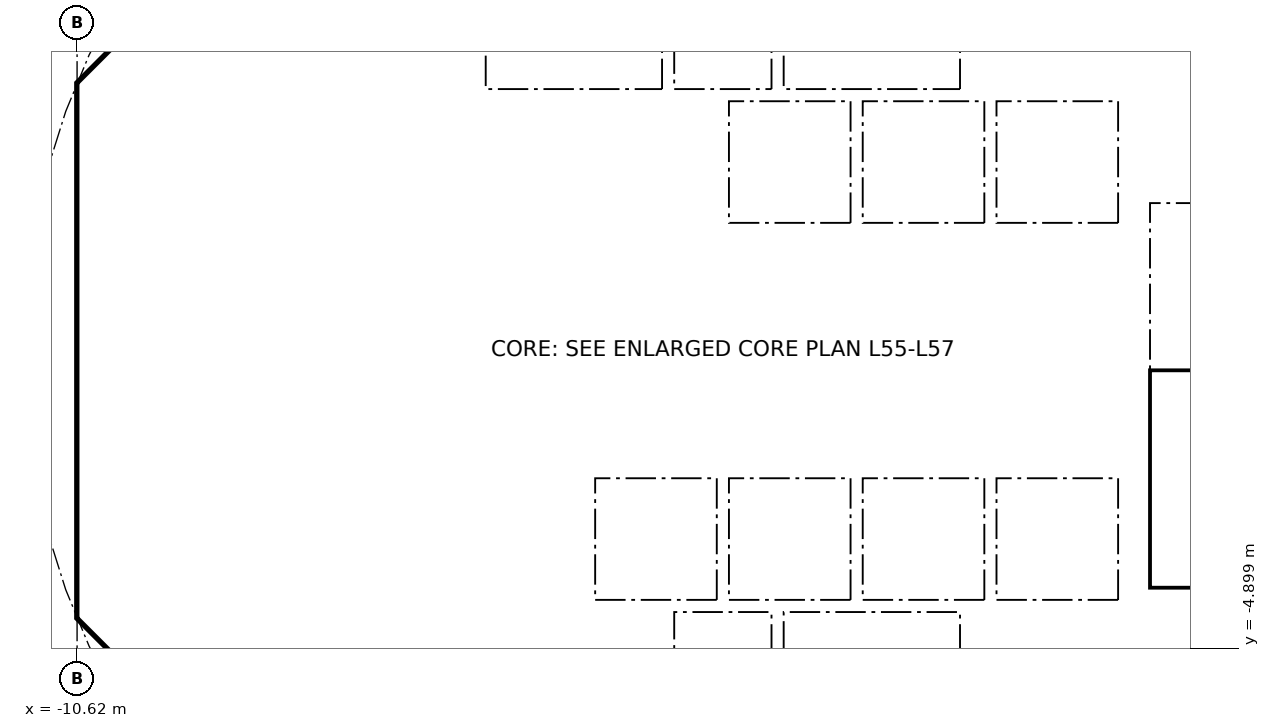
"""IFC4 building model, lengths in metres.
Left out: names, types, materials, properties, quantities, classifications, styles, units other than length and angle.
Written with IfcOpenShell. Run it as: python <this file> out.ifc"""

import sys

from ifc_helpers import new_model, si_unit, direction, frame, frame_2d, origin, place, context, subcontext, project, spatial, polyline, rectangle, outline, extrude, element, fill, save


model = new_model("IFC4")
c1 = context("Model", 3, precision=1e-05, world=origin(), true_north=direction((0.0, 1.0)))
c2 = subcontext(c1, "Body", "Model", "MODEL_VIEW")
j1 = project(units=[si_unit("LENGTHUNIT", "METRE"), si_unit("PLANEANGLEUNIT", "RADIAN")], contexts=[c1])
p1 = place(None, origin())
s1 = spatial("IfcSite", under=j1, at=p1, CompositionType="ELEMENT")
p2 = place(p1, origin())
s2 = spatial("IfcBuilding", under=s1, at=p2, CompositionType="ELEMENT")
p3 = place(p2, frame((0.0, 0.0, 223.3)))
s3 = spatial("IfcBuildingStorey", under=s2, at=p3, CompositionType="ELEMENT", Elevation=223.3)
p4 = place(p3, frame((9.988, 4.613, 0.0), z_axis=(0.0, 0.0, 1.0), x_axis=(-0.707106781187, 0.707106781187, 0.0)))
e1 = element("IfcWall", 1, at=p4, inside=s3, PredefinedType="SHEAR", context=c2, shape_type="SweptSolid", body=[
    extrude(rectangle(XDim=7.602, YDim=0.6, at=frame_2d((3.801, 0.0))), origin(), (0.0, 0.0, 1.0), 3.44),
])
p5 = place(p4, frame((3.201, 0.0, 0.0)))
e2 = element("IfcOpeningElement", 2, at=p5, cuts=e1, PredefinedType="OPENING", context=c2, shape_type="SweptSolid", body=[
    extrude(rectangle(XDim=1.2, YDim=2.1, at=frame_2d((0.6, 1.05))), frame((0.0, 0.31, 0.0), z_axis=(0.0, -1.0, 0.0), x_axis=(1.0, 0.0, 0.0)), (0.0, 0.0, 1.0), 0.62),
])
p6 = place(p3, frame((-4.613, 9.988, 0.0), z_axis=(0.0, 0.0, 1.0), x_axis=(-0.707106781187, -0.707106781187, 0.0)))
e3 = element("IfcWall", 3, at=p6, inside=s3, PredefinedType="SHEAR", context=c2, shape_type="SweptSolid", body=[
    extrude(rectangle(XDim=7.602, YDim=0.6, at=frame_2d((3.801, 0.0))), origin(), (0.0, 0.0, 1.0), 3.44),
])
p7 = place(p6, frame((0.351, 0.0, 0.0)))
e4 = element("IfcOpeningElement", 4, at=p7, cuts=e3, PredefinedType="OPENING", context=c2, shape_type="SweptSolid", body=[
    extrude(rectangle(XDim=1.1, YDim=2.1, at=frame_2d((0.55, 1.05))), frame((0.0, 0.31, 0.0), z_axis=(0.0, -1.0, 0.0), x_axis=(1.0, 0.0, 0.0)), (0.0, 0.0, 1.0), 0.62),
])
p8 = place(p3, frame((-10.325, 3.801, 0.0), z_axis=(0.0, 0.0, 1.0), x_axis=(0.0, -1.0, 0.0)))
e5 = element("IfcWall", 5, at=p8, inside=s3, PredefinedType="SHEAR", context=c2, shape_type="SweptSolid", body=[
    extrude(rectangle(XDim=7.602, YDim=0.6, at=frame_2d((3.801, 0.0))), origin(), (0.0, 0.0, 1.0), 3.44),
])
p9 = place(p8, frame((0.651, 0.0, 0.0)))
e6 = element("IfcOpeningElement", 6, at=p9, cuts=e5, PredefinedType="OPENING", context=c2, shape_type="SweptSolid", body=[
    extrude(rectangle(XDim=1.5, YDim=2.1, at=frame_2d((0.75, 1.05))), frame((0.0, 0.31, 0.0), z_axis=(0.0, -1.0, 0.0), x_axis=(1.0, 0.0, 0.0)), (0.0, 0.0, 1.0), 0.62),
])
p10 = place(p8, frame((5.451, 0.0, 0.0)))
e7 = element("IfcOpeningElement", 7, at=p10, cuts=e5, PredefinedType="OPENING", context=c2, shape_type="SweptSolid", body=[
    extrude(rectangle(XDim=1.5, YDim=2.1, at=frame_2d((0.75, 1.05))), frame((0.0, 0.31, 0.0), z_axis=(0.0, -1.0, 0.0), x_axis=(1.0, 0.0, 0.0)), (0.0, 0.0, 1.0), 0.62),
])
p11 = place(p3, frame((-9.988, -4.613, 0.0), z_axis=(0.0, 0.0, 1.0), x_axis=(0.707106781187, -0.707106781187, 0.0)))
e8 = element("IfcWall", 8, at=p11, inside=s3, PredefinedType="SHEAR", context=c2, shape_type="SweptSolid", body=[
    extrude(rectangle(XDim=7.602, YDim=0.6, at=frame_2d((3.801, 0.0))), origin(), (0.0, 0.0, 1.0), 3.44),
])
p12 = place(p11, frame((6.151, 0.0, 0.0)))
e9 = element("IfcOpeningElement", 9, at=p12, cuts=e8, PredefinedType="OPENING", context=c2, shape_type="SweptSolid", body=[
    extrude(rectangle(XDim=1.1, YDim=2.1, at=frame_2d((0.55, 1.05))), frame((0.0, 0.31, 0.0), z_axis=(0.0, -1.0, 0.0), x_axis=(1.0, 0.0, 0.0)), (0.0, 0.0, 1.0), 0.62),
])
p13 = place(p3, frame((4.613, -9.988, 0.0), z_axis=(0.0, 0.0, 1.0), x_axis=(0.707106781187, 0.707106781187, 0.0)))
e10 = element("IfcWall", 10, at=p13, inside=s3, PredefinedType="SHEAR", context=c2, shape_type="SweptSolid", body=[
    extrude(rectangle(XDim=7.602, YDim=0.6, at=frame_2d((3.801, 0.0))), origin(), (0.0, 0.0, 1.0), 3.44),
])
p14 = place(p13, frame((3.201, 0.0, 0.0)))
e11 = element("IfcOpeningElement", 11, at=p14, cuts=e10, PredefinedType="OPENING", context=c2, shape_type="SweptSolid", body=[
    extrude(rectangle(XDim=1.2, YDim=2.1, at=frame_2d((0.6, 1.05))), frame((0.0, 0.31, 0.0), z_axis=(0.0, -1.0, 0.0), x_axis=(1.0, 0.0, 0.0)), (0.0, 0.0, 1.0), 0.62),
])
p15 = place(p3, frame((-6.2, 4.3, 0.0), z_axis=(0.0, 0.0, 1.0), x_axis=(0.0, 1.0, 0.0)))
e12 = element("IfcWall", 12, at=p15, inside=s3, PredefinedType="PARTITIONING", context=c2, shape_type="SweptSolid", body=[
    extrude(rectangle(XDim=3.527, YDim=0.15, at=frame_2d((1.763, 0.0))), origin(), (0.0, 0.0, 1.0), 3.44),
])
p16 = place(p15, frame((0.262, 0.0, 0.0)))
e13 = element("IfcOpeningElement", 13, at=p16, cuts=e12, PredefinedType="OPENING", context=c2, shape_type="SweptSolid", body=[
    extrude(rectangle(XDim=0.9, YDim=2.1, at=frame_2d((0.45, 1.05))), frame((0.0, 0.085, 0.0), z_axis=(0.0, -1.0, 0.0), x_axis=(1.0, 0.0, 0.0)), (0.0, 0.0, 1.0), 0.17),
])
p17 = place(p15, frame((2.138, 0.0, 0.0)))
e14 = element("IfcOpeningElement", 14, at=p17, cuts=e12, PredefinedType="OPENING", context=c2, shape_type="SweptSolid", body=[
    extrude(rectangle(XDim=0.9, YDim=2.1, at=frame_2d((0.45, 1.05))), frame((0.0, 0.085, 0.0), z_axis=(0.0, -1.0, 0.0), x_axis=(1.0, 0.0, 0.0)), (0.0, 0.0, 1.0), 0.17),
])
p18 = place(p3, frame((4.0, 4.3, 0.0), z_axis=(0.0, 0.0, 1.0), x_axis=(0.0, 1.0, 0.0)))
e15 = element("IfcWall", 15, at=p18, inside=s3, PredefinedType="SOLIDWALL", context=c2, shape_type="SweptSolid", body=[
    extrude(rectangle(XDim=2.2, YDim=0.2, at=frame_2d((1.1, 0.0))), origin(), (0.0, 0.0, 1.0), 3.44),
])
p19 = place(p18, frame((0.55, 0.0, 0.0)))
e16 = element("IfcOpeningElement", 16, at=p19, cuts=e15, PredefinedType="OPENING", context=c2, shape_type="SweptSolid", body=[
    extrude(rectangle(XDim=1.1, YDim=2.1, at=frame_2d((0.55, 1.05))), frame((0.0, 0.11, 0.0), z_axis=(0.0, -1.0, 0.0), x_axis=(1.0, 0.0, 0.0)), (0.0, 0.0, 1.0), 0.22),
])
p20 = place(p3, frame((-4.0, 4.3, 0.0), z_axis=(0.0, 0.0, 1.0), x_axis=(0.0, 1.0, 0.0)))
e17 = element("IfcWall", 17, at=p20, inside=s3, PredefinedType="SOLIDWALL", context=c2, shape_type="SweptSolid", body=[
    extrude(rectangle(XDim=2.2, YDim=0.2, at=frame_2d((1.1, 0.0))), origin(), (0.0, 0.0, 1.0), 3.44),
])
p21 = place(p20, frame((0.55, 0.0, 0.0)))
e18 = element("IfcOpeningElement", 18, at=p21, cuts=e17, PredefinedType="OPENING", context=c2, shape_type="SweptSolid", body=[
    extrude(rectangle(XDim=1.1, YDim=2.1, at=frame_2d((0.55, 1.05))), frame((0.0, 0.11, 0.0), z_axis=(0.0, -1.0, 0.0), x_axis=(1.0, 0.0, 0.0)), (0.0, 0.0, 1.0), 0.22),
])
p22 = place(p3, frame((-6.7, 2.0, 0.0), z_axis=(0.0, 0.0, 1.0), x_axis=(1.0, 0.0, 0.0)))
e19 = element("IfcWall", 19, at=p22, inside=s3, PredefinedType="SOLIDWALL", context=c2, shape_type="SweptSolid", body=[
    extrude(rectangle(XDim=13.4, YDim=0.2, at=frame_2d((6.7, 0.0))), origin(), (0.0, 0.0, 1.0), 3.44),
])
p23 = place(p22, frame((7.25, 0.0, 0.0)))
e20 = element("IfcOpeningElement", 20, at=p23, cuts=e19, PredefinedType="OPENING", context=c2, shape_type="SweptSolid", body=[
    extrude(rectangle(XDim=1.1, YDim=2.1, at=frame_2d((0.55, 1.05))), frame((0.0, 0.11, 0.0), z_axis=(0.0, -1.0, 0.0), x_axis=(1.0, 0.0, 0.0)), (0.0, 0.0, 1.0), 0.22),
])
p24 = place(p22, frame((9.45, 0.0, 0.0)))
e21 = element("IfcOpeningElement", 21, at=p24, cuts=e19, PredefinedType="OPENING", context=c2, shape_type="SweptSolid", body=[
    extrude(rectangle(XDim=1.1, YDim=2.1, at=frame_2d((0.55, 1.05))), frame((0.0, 0.11, 0.0), z_axis=(0.0, -1.0, 0.0), x_axis=(1.0, 0.0, 0.0)), (0.0, 0.0, 1.0), 0.22),
])
p25 = place(p22, frame((1.85, 0.0, 0.0)))
e22 = element("IfcOpeningElement", 22, at=p25, cuts=e19, PredefinedType="OPENING", context=c2, shape_type="SweptSolid", body=[
    extrude(rectangle(XDim=0.9, YDim=2.1, at=frame_2d((0.45, 1.05))), frame((0.0, 0.11, 0.0), z_axis=(0.0, -1.0, 0.0), x_axis=(1.0, 0.0, 0.0)), (0.0, 0.0, 1.0), 0.22),
])
p26 = place(p22, frame((5.15, 0.0, 0.0)))
e23 = element("IfcOpeningElement", 23, at=p26, cuts=e19, PredefinedType="OPENING", context=c2, shape_type="SweptSolid", body=[
    extrude(rectangle(XDim=0.9, YDim=2.1, at=frame_2d((0.45, 1.05))), frame((0.0, 0.11, 0.0), z_axis=(0.0, -1.0, 0.0), x_axis=(1.0, 0.0, 0.0)), (0.0, 0.0, 1.0), 0.22),
])
p27 = place(p3, frame((6.7, 4.0, 0.0), z_axis=(0.0, 0.0, 1.0), x_axis=(1.0, 0.0, 0.0)))
e24 = element("IfcWall", 24, at=p27, inside=s3, PredefinedType="SOLIDWALL", context=c2, shape_type="SweptSolid", body=[
    extrude(rectangle(XDim=3.325, YDim=0.2, at=frame_2d((1.662, 0.0))), origin(), (0.0, 0.0, 1.0), 3.44),
])
p28 = place(p27, frame((1.25, 0.0, 0.0)))
e25 = element("IfcOpeningElement", 25, at=p28, cuts=e24, PredefinedType="OPENING", context=c2, shape_type="SweptSolid", body=[
    extrude(rectangle(XDim=1.1, YDim=2.1, at=frame_2d((0.55, 1.05))), frame((0.0, 0.11, 0.0), z_axis=(0.0, -1.0, 0.0), x_axis=(1.0, 0.0, 0.0)), (0.0, 0.0, 1.0), 0.22),
])
p29 = place(p3, frame((-6.6, -7.427, 0.0), z_axis=(0.0, 0.0, 1.0), x_axis=(0.0, 1.0, 0.0)))
e26 = element("IfcWall", 26, at=p29, inside=s3, PredefinedType="PARTITIONING", context=c2, shape_type="SweptSolid", body=[
    extrude(rectangle(XDim=3.127, YDim=0.15, at=frame_2d((1.563, 0.0))), origin(), (0.0, 0.0, 1.0), 3.44),
])
p30 = place(p29, frame((1.076, 0.0, 0.0)))
e27 = element("IfcOpeningElement", 27, at=p30, cuts=e26, PredefinedType="OPENING", context=c2, shape_type="SweptSolid", body=[
    extrude(rectangle(XDim=0.9, YDim=2.1, at=frame_2d((0.45, 1.05))), frame((0.0, 0.085, 0.0), z_axis=(0.0, -1.0, 0.0), x_axis=(1.0, 0.0, 0.0)), (0.0, 0.0, 1.0), 0.17),
])
p31 = place(p3, frame((4.0, -6.5, 0.0), z_axis=(0.0, 0.0, 1.0), x_axis=(0.0, 1.0, 0.0)))
e28 = element("IfcWall", 28, at=p31, inside=s3, PredefinedType="SOLIDWALL", context=c2, shape_type="SweptSolid", body=[
    extrude(rectangle(XDim=2.2, YDim=0.2, at=frame_2d((1.1, 0.0))), origin(), (0.0, 0.0, 1.0), 3.44),
])
p32 = place(p31, frame((0.55, 0.0, 0.0)))
e29 = element("IfcOpeningElement", 29, at=p32, cuts=e28, PredefinedType="OPENING", context=c2, shape_type="SweptSolid", body=[
    extrude(rectangle(XDim=1.1, YDim=2.1, at=frame_2d((0.55, 1.05))), frame((0.0, 0.11, 0.0), z_axis=(0.0, -1.0, 0.0), x_axis=(1.0, 0.0, 0.0)), (0.0, 0.0, 1.0), 0.22),
])
p33 = place(p3, frame((-4.0, -6.5, 0.0), z_axis=(0.0, 0.0, 1.0), x_axis=(0.0, 1.0, 0.0)))
e30 = element("IfcWall", 30, at=p33, inside=s3, PredefinedType="SOLIDWALL", context=c2, shape_type="SweptSolid", body=[
    extrude(rectangle(XDim=2.2, YDim=0.2, at=frame_2d((1.1, 0.0))), origin(), (0.0, 0.0, 1.0), 3.44),
])
p34 = place(p33, frame((0.65, 0.0, 0.0)))
e31 = element("IfcOpeningElement", 31, at=p34, cuts=e30, PredefinedType="OPENING", context=c2, shape_type="SweptSolid", body=[
    extrude(rectangle(XDim=0.9, YDim=2.1, at=frame_2d((0.45, 1.05))), frame((0.0, 0.11, 0.0), z_axis=(0.0, -1.0, 0.0), x_axis=(1.0, 0.0, 0.0)), (0.0, 0.0, 1.0), 0.22),
])
p35 = place(p3, frame((-6.7, -2.0, 0.0), z_axis=(0.0, 0.0, 1.0), x_axis=(1.0, 0.0, 0.0)))
e32 = element("IfcWall", 32, at=p35, inside=s3, PredefinedType="SOLIDWALL", context=c2, shape_type="SweptSolid", body=[
    extrude(rectangle(XDim=13.4, YDim=0.2, at=frame_2d((6.7, 0.0))), origin(), (0.0, 0.0, 1.0), 3.44),
])
p36 = place(p35, frame((5.05, 0.0, 0.0)))
e33 = element("IfcOpeningElement", 33, at=p36, cuts=e32, PredefinedType="OPENING", context=c2, shape_type="SweptSolid", body=[
    extrude(rectangle(XDim=1.1, YDim=2.1, at=frame_2d((0.55, 1.05))), frame((0.0, 0.11, 0.0), z_axis=(0.0, -1.0, 0.0), x_axis=(1.0, 0.0, 0.0)), (0.0, 0.0, 1.0), 0.22),
])
p37 = place(p35, frame((7.25, 0.0, 0.0)))
e34 = element("IfcOpeningElement", 34, at=p37, cuts=e32, PredefinedType="OPENING", context=c2, shape_type="SweptSolid", body=[
    extrude(rectangle(XDim=1.1, YDim=2.1, at=frame_2d((0.55, 1.05))), frame((0.0, 0.11, 0.0), z_axis=(0.0, -1.0, 0.0), x_axis=(1.0, 0.0, 0.0)), (0.0, 0.0, 1.0), 0.22),
])
p38 = place(p35, frame((1.85, 0.0, 0.0)))
e35 = element("IfcOpeningElement", 35, at=p38, cuts=e32, PredefinedType="OPENING", context=c2, shape_type="SweptSolid", body=[
    extrude(rectangle(XDim=0.9, YDim=2.1, at=frame_2d((0.45, 1.05))), frame((0.0, 0.11, 0.0), z_axis=(0.0, -1.0, 0.0), x_axis=(1.0, 0.0, 0.0)), (0.0, 0.0, 1.0), 0.22),
])
p39 = place(p3, origin())
e36 = element("IfcWall", 36, at=p39, inside=s3, PredefinedType="SHEAR", context=c2, shape_type="SweptSolid", body=[
    extrude(outline(polyline([(-10.625, -3.801), (-10.025, -3.801), (-10.025, -4.152), (-9.776, -4.401), (-10.2, -4.825), (-10.625, -4.401), (-10.625, -3.801)])), origin(), (0.0, 0.0, 1.0), 3.44),
])
p40 = place(p3, origin())
e37 = element("IfcWall", 37, at=p40, inside=s3, PredefinedType="SHEAR", context=c2, shape_type="SweptSolid", body=[
    extrude(outline(polyline([(-10.2, 4.825), (-9.776, 4.401), (-10.025, 4.152), (-10.025, 3.801), (-10.625, 3.801), (-10.625, 4.401), (-10.2, 4.825)])), origin(), (0.0, 0.0, 1.0), 3.44),
])
for number, where, z_axis, x_axis in (
    (38, (-10.025, -4.0, 0.0), (0.0, 0.0, 1.0), (1.0, 0.0, 0.0)),
    (39, (-10.025, 4.0, 0.0), (0.0, 0.0, 1.0), (1.0, 0.0, 0.0)),
):
    element("IfcWall", number, at=place(p3, frame(where, z_axis=z_axis, x_axis=x_axis)), inside=s3, PredefinedType="PARTITIONING", context=c2, shape_type="SweptSolid", body=[
        extrude(rectangle(XDim=3.325, YDim=0.2, at=frame_2d((1.662, 0.0))), origin(), (0.0, 0.0, 1.0), 3.44),
    ])
for number, where, z_axis, x_axis in (
    (40, (-0.9, -6.5, 0.0), (0.0, 0.0, 1.0), (0.0, 1.0, 0.0)),
    (41, (0.9, -6.5, 0.0), (0.0, 0.0, 1.0), (0.0, 1.0, 0.0)),
):
    element("IfcWall", number, at=place(p3, frame(where, z_axis=z_axis, x_axis=x_axis)), inside=s3, PredefinedType="SOLIDWALL", context=c2, shape_type="SweptSolid", body=[
        extrude(rectangle(XDim=2.2, YDim=0.2, at=frame_2d((1.1, 0.0))), origin(), (0.0, 0.0, 1.0), 3.44),
    ])
p41 = place(p3, origin())
e42 = element("IfcWall", 42, at=p41, inside=s3, PredefinedType="SOLIDWALL", context=c2, shape_type="SweptSolid", body=[
    extrude(outline(polyline([(-6.7, -2.1), (-6.5, -2.1), (-6.5, -4.1), (-2.3, -4.1), (-2.3, -2.1), (-2.1, -2.1), (-2.1, -4.1), (-0.1, -4.1), (-0.1, -2.1), (0.1, -2.1), (0.1, -4.1), (2.1, -4.1), (2.1, -2.1), (2.3, -2.1), (2.3, -4.1), (4.3, -4.1), (4.3, -2.1), (4.5, -2.1), (4.5, -4.1), (6.5, -4.1), (6.5, -2.1), (6.7, -2.1), (6.7, -4.3), (-6.7, -4.3), (-6.7, -2.1)])), origin(), (0.0, 0.0, 1.0), 3.44),
])
for number, where, z_axis, x_axis in (
    (43, (-0.9, 4.3, 0.0), (0.0, 0.0, 1.0), (0.0, 1.0, 0.0)),
    (44, (0.9, 4.3, 0.0), (0.0, 0.0, 1.0), (0.0, 1.0, 0.0)),
):
    element("IfcWall", number, at=place(p3, frame(where, z_axis=z_axis, x_axis=x_axis)), inside=s3, PredefinedType="SOLIDWALL", context=c2, shape_type="SweptSolid", body=[
        extrude(rectangle(XDim=2.2, YDim=0.2, at=frame_2d((1.1, 0.0))), origin(), (0.0, 0.0, 1.0), 3.44),
    ])
p42 = place(p3, origin())
e45 = element("IfcWall", 45, at=p42, inside=s3, PredefinedType="SOLIDWALL", context=c2, shape_type="SweptSolid", body=[
    extrude(outline(polyline([(-6.7, 4.3), (6.7, 4.3), (6.7, 2.1), (6.5, 2.1), (6.5, 4.1), (4.5, 4.1), (4.5, 2.1), (4.3, 2.1), (4.3, 4.1), (2.3, 4.1), (2.3, 2.1), (2.1, 2.1), (2.1, 4.1), (0.1, 4.1), (0.1, 2.1), (-0.1, 2.1), (-0.1, 4.1), (-2.1, 4.1), (-2.1, 2.1), (-2.3, 2.1), (-2.3, 4.1), (-6.5, 4.1), (-6.5, 2.1), (-6.7, 2.1), (-6.7, 4.3)])), origin(), (0.0, 0.0, 1.0), 3.44),
])
p43 = place(p3, origin())
e46 = element("IfcWall", 46, at=p43, inside=s3, PredefinedType="SOLIDWALL", context=c2, shape_type="SweptSolid", body=[
    extrude(outline(polyline([(7.025, -3.9), (6.7, -3.9), (6.7, 3.9), (7.025, 3.9), (7.025, -3.9)])), origin(), (0.0, 0.0, 1.0), 3.44),
])
p44 = place(p3, origin())
e47 = element("IfcWall", 47, at=p44, inside=s3, PredefinedType="SOLIDWALL", context=c2, shape_type="SweptSolid", body=[
    extrude(outline(polyline([(10.025, -4.1), (6.7, -4.1), (6.7, -3.9), (10.025, -3.9), (10.025, -4.1)])), origin(), (0.0, 0.0, 1.0), 3.44),
])
p45 = place(p23, origin())
e48 = element("IfcDoor", 48, at=p45, inside=s3, OperationType="DOUBLE_DOOR_SLIDING", PredefinedType="DOOR", context=c2, shape_type="SweptSolid", body=[
    extrude(rectangle(XDim=1.1, YDim=2.1, at=frame_2d((0.55, 1.05))), frame((0.0, 0.025, 0.0), z_axis=(0.0, -1.0, 0.0), x_axis=(1.0, 0.0, 0.0)), (0.0, 0.0, 1.0), 0.05),
])
fill(e20, e48)
p46 = place(p24, origin())
e49 = element("IfcDoor", 49, at=p46, inside=s3, OperationType="DOUBLE_DOOR_SLIDING", PredefinedType="DOOR", context=c2, shape_type="SweptSolid", body=[
    extrude(rectangle(XDim=1.1, YDim=2.1, at=frame_2d((0.55, 1.05))), frame((0.0, 0.025, 0.0), z_axis=(0.0, -1.0, 0.0), x_axis=(1.0, 0.0, 0.0)), (0.0, 0.0, 1.0), 0.05),
])
fill(e21, e49)
p47 = place(p36, origin())
e50 = element("IfcDoor", 50, at=p47, inside=s3, OperationType="DOUBLE_DOOR_SLIDING", PredefinedType="DOOR", context=c2, shape_type="SweptSolid", body=[
    extrude(rectangle(XDim=1.1, YDim=2.1, at=frame_2d((0.55, 1.05))), frame((0.0, 0.025, 0.0), z_axis=(0.0, -1.0, 0.0), x_axis=(1.0, 0.0, 0.0)), (0.0, 0.0, 1.0), 0.05),
])
fill(e33, e50)
p48 = place(p37, origin())
e51 = element("IfcDoor", 51, at=p48, inside=s3, OperationType="DOUBLE_DOOR_SLIDING", PredefinedType="DOOR", context=c2, shape_type="SweptSolid", body=[
    extrude(rectangle(XDim=1.1, YDim=2.1, at=frame_2d((0.55, 1.05))), frame((0.0, 0.025, 0.0), z_axis=(0.0, -1.0, 0.0), x_axis=(1.0, 0.0, 0.0)), (0.0, 0.0, 1.0), 0.05),
])
fill(e34, e51)
p49 = place(p19, origin())
e52 = element("IfcDoor", 52, at=p49, inside=s3, OperationType="DOUBLE_DOOR_SLIDING", PredefinedType="DOOR", context=c2, shape_type="SweptSolid", body=[
    extrude(rectangle(XDim=1.1, YDim=2.1, at=frame_2d((0.55, 1.05))), frame((0.0, 0.025, 0.0), z_axis=(0.0, -1.0, 0.0), x_axis=(1.0, 0.0, 0.0)), (0.0, 0.0, 1.0), 0.05),
])
fill(e16, e52)
p50 = place(p32, origin())
e53 = element("IfcDoor", 53, at=p50, inside=s3, OperationType="DOUBLE_DOOR_SLIDING", PredefinedType="DOOR", context=c2, shape_type="SweptSolid", body=[
    extrude(rectangle(XDim=1.1, YDim=2.1, at=frame_2d((0.55, 1.05))), frame((0.0, 0.025, 0.0), z_axis=(0.0, -1.0, 0.0), x_axis=(1.0, 0.0, 0.0)), (0.0, 0.0, 1.0), 0.05),
])
fill(e29, e53)
p51 = place(p21, origin())
e54 = element("IfcDoor", 54, at=p51, inside=s3, OperationType="DOUBLE_DOOR_SLIDING", PredefinedType="DOOR", context=c2, shape_type="SweptSolid", body=[
    extrude(rectangle(XDim=1.1, YDim=2.1, at=frame_2d((0.55, 1.05))), frame((0.0, 0.025, 0.0), z_axis=(0.0, -1.0, 0.0), x_axis=(1.0, 0.0, 0.0)), (0.0, 0.0, 1.0), 0.05),
])
fill(e18, e54)
p52 = place(p16, origin())
e55 = element("IfcDoor", 55, at=p52, inside=s3, OperationType="SINGLE_SWING_RIGHT", PredefinedType="DOOR", context=c2, shape_type="SweptSolid", body=[
    extrude(rectangle(XDim=0.9, YDim=2.1, at=frame_2d((0.45, 1.05))), frame((0.0, 0.025, 0.0), z_axis=(0.0, -1.0, 0.0), x_axis=(1.0, 0.0, 0.0)), (0.0, 0.0, 1.0), 0.05),
])
fill(e13, e55)
p53 = place(p25, origin())
e56 = element("IfcDoor", 56, at=p53, inside=s3, OperationType="SINGLE_SWING_LEFT", PredefinedType="DOOR", context=c2, shape_type="SweptSolid", body=[
    extrude(rectangle(XDim=0.9, YDim=2.1, at=frame_2d((0.45, 1.05))), frame((0.0, 0.025, 0.0), z_axis=(0.0, -1.0, 0.0), x_axis=(1.0, 0.0, 0.0)), (0.0, 0.0, 1.0), 0.05),
])
fill(e22, e56)
p54 = place(p26, origin())
e57 = element("IfcDoor", 57, at=p54, inside=s3, OperationType="SINGLE_SWING_LEFT", PredefinedType="DOOR", context=c2, shape_type="SweptSolid", body=[
    extrude(rectangle(XDim=0.9, YDim=2.1, at=frame_2d((0.45, 1.05))), frame((0.0, 0.025, 0.0), z_axis=(0.0, -1.0, 0.0), x_axis=(1.0, 0.0, 0.0)), (0.0, 0.0, 1.0), 0.05),
])
fill(e23, e57)
p55 = place(p38, frame((0.9, 0.0, 0.0), x_axis=(-1.0, 0.0, 0.0)))
e58 = element("IfcDoor", 58, at=p55, inside=s3, OperationType="SINGLE_SWING_RIGHT", PredefinedType="DOOR", context=c2, shape_type="SweptSolid", body=[
    extrude(rectangle(XDim=0.9, YDim=2.1, at=frame_2d((0.45, 1.05))), frame((0.0, 0.025, 0.0), z_axis=(0.0, -1.0, 0.0), x_axis=(1.0, 0.0, 0.0)), (0.0, 0.0, 1.0), 0.05),
])
fill(e35, e58)
p56 = place(p9, origin())
e59 = element("IfcDoor", 59, at=p56, inside=s3, OperationType="DOUBLE_DOOR_SINGLE_SWING", PredefinedType="DOOR", context=c2, shape_type="SweptSolid", body=[
    extrude(rectangle(XDim=1.5, YDim=2.1, at=frame_2d((0.75, 1.05))), frame((0.0, 0.025, 0.0), z_axis=(0.0, -1.0, 0.0), x_axis=(1.0, 0.0, 0.0)), (0.0, 0.0, 1.0), 0.05),
])
fill(e6, e59)
p57 = place(p10, origin())
e60 = element("IfcDoor", 60, at=p57, inside=s3, OperationType="DOUBLE_DOOR_SINGLE_SWING", PredefinedType="DOOR", context=c2, shape_type="SweptSolid", body=[
    extrude(rectangle(XDim=1.5, YDim=2.1, at=frame_2d((0.75, 1.05))), frame((0.0, 0.025, 0.0), z_axis=(0.0, -1.0, 0.0), x_axis=(1.0, 0.0, 0.0)), (0.0, 0.0, 1.0), 0.05),
])
fill(e7, e60)
save(model, sys.argv[1])
